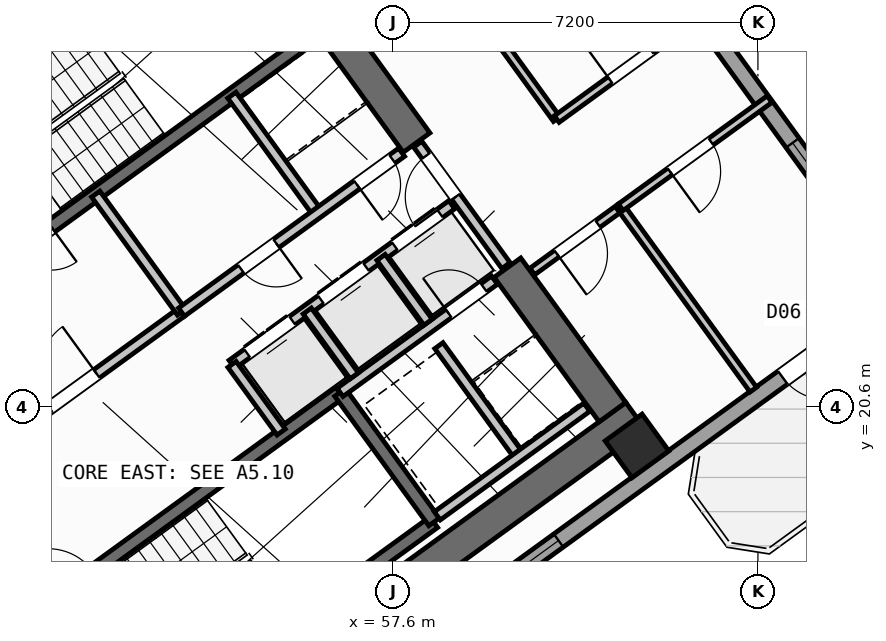
"""IFC4 building model, lengths in metres.
Left out: names, types, materials, properties, quantities, classifications, styles, units other than length and angle.
Written with IfcOpenShell. Run it as: python <this file> out.ifc"""

import sys

from ifc_helpers import new_model, si_unit, direction, frame, frame_2d, origin, origin_2d, place, context, subcontext, project, spatial, rectangle, hollow_rectangle, extrude, source, transform, mapped, element, fill, save


model = new_model("IFC4")
c1 = context("Model", 3, precision=1e-05, world=origin(), true_north=direction((0.0, 1.0)))
c2 = subcontext(c1, "Body", "Model", "MODEL_VIEW")
j1 = project(units=[si_unit("LENGTHUNIT", "METRE"), si_unit("PLANEANGLEUNIT", "RADIAN")], contexts=[c1])
p1 = place(None, origin())
s1 = spatial("IfcSite", under=j1, at=p1, CompositionType="ELEMENT")
p2 = place(p1, origin())
s2 = spatial("IfcBuilding", under=s1, at=p2, CompositionType="ELEMENT")
p3 = place(p2, frame((0.0, 0.0, 90.0)))
s3 = spatial("IfcBuildingStorey", under=s2, at=p3, CompositionType="ELEMENT", Elevation=90.0)
p4 = place(p3, frame((52.318, 13.11, 0.0), z_axis=(0.0, 0.0, 1.0), x_axis=(0.809019445368, 0.587781878776, 0.0)))
e1 = element("IfcWall", 1, at=p4, inside=s3, PredefinedType="SHEAR", context=c2, shape_type="SweptSolid", body=[
    extrude(rectangle(XDim=12.44, YDim=0.65, at=frame_2d((6.22, 0.0))), origin(), (0.0, 0.0, 1.0), 3.35),
])
p5 = place(p3, frame((44.325, 24.113, 0.0), z_axis=(0.0, 0.0, 1.0), x_axis=(0.809012664862, 0.58779121131, 0.0)))
e2 = element("IfcWall", 2, at=p5, inside=s3, PredefinedType="SHEAR", context=c2, shape_type="SweptSolid", body=[
    extrude(rectangle(XDim=12.44, YDim=0.65, at=frame_2d((6.22, 0.0))), origin(), (0.0, 0.0, 1.0), 3.35),
])
p6 = place(p3, frame((61.929, 20.494, 0.0), z_axis=(0.0, 0.0, 1.0), x_axis=(-0.58782982593, 0.808984607855, 0.0)))
e3 = element("IfcWall", 3, at=p6, inside=s3, PredefinedType="SHEAR", context=c2, shape_type="SweptSolid", body=[
    extrude(rectangle(XDim=3.525, YDim=0.65, at=frame_2d((1.762, 0.0))), origin(), (0.0, 0.0, 1.0), 3.35),
])
p7 = place(p3, frame((58.064, 25.813, 0.0), z_axis=(0.0, 0.0, 1.0), x_axis=(-0.58777996584, 0.809020835181, 0.0)))
e4 = element("IfcWall", 4, at=p7, inside=s3, PredefinedType="SHEAR", context=c2, shape_type="SweptSolid", body=[
    extrude(rectangle(XDim=6.375, YDim=0.65, at=frame_2d((3.188, 0.0))), origin(), (0.0, 0.0, 1.0), 3.35),
])
m1 = source(origin(), c2, "Body", "SweptSolid", [
    extrude(hollow_rectangle(XDim=0.9, YDim=0.9, WallThickness=0.036, at=origin_2d()), origin(), (0.0, 0.0, 1.0), 3.6),
])
p8 = place(p3, frame((62.414, 19.827, 0.0), z_axis=(0.0, 0.0, 1.0), x_axis=(0.809016994375, 0.587785252292, 0.0)))
e5 = element("IfcColumn", 5, at=p8, inside=s3, PredefinedType="COLUMN", context=c2, shape_type="MappedRepresentation", body=[
    mapped(m1, transform((0.0, 0.0, 0.0), scale=1.0)),
])
p9 = place(p3, frame((54.81, 40.5, 0.0), z_axis=(0.0, 0.0, 1.0), x_axis=(0.587783625747, -0.809018176127, 0.0)))
e6 = element("IfcWall", 6, at=p9, inside=s3, PredefinedType="STANDARD", context=c2, shape_type="SweptSolid", body=[
    extrude(rectangle(XDim=21.587, YDim=0.32, at=frame_2d((10.794, 0.0))), origin(), (0.0, 0.0, 1.0), 2.775),
])
p10 = place(p9, frame((9.194, 0.0, 0.8)))
e7 = element("IfcOpeningElement", 7, at=p10, cuts=e6, PredefinedType="OPENING", context=c2, shape_type="SweptSolid", body=[
    extrude(rectangle(XDim=2.1, YDim=1.55, at=frame_2d((1.05, 0.775))), frame((0.0, 0.17, 0.0), z_axis=(0.0, -1.0, 0.0), x_axis=(1.0, 0.0, 0.0)), (0.0, 0.0, 1.0), 0.34),
])
p11 = place(p9, frame((18.159, 0.0, 0.85)))
e8 = element("IfcOpeningElement", 8, at=p11, cuts=e6, PredefinedType="OPENING", context=c2, shape_type="SweptSolid", body=[
    extrude(rectangle(XDim=1.8, YDim=1.5, at=frame_2d((0.9, 0.75))), frame((0.0, 0.17, 0.0), z_axis=(0.0, -1.0, 0.0), x_axis=(1.0, 0.0, 0.0)), (0.0, 0.0, 1.0), 0.34),
])
p12 = place(p3, frame((67.454, 22.747, 0.0), z_axis=(0.0, 0.0, 1.0), x_axis=(-0.809021120468, -0.587779573171, 0.0)))
e9 = element("IfcWall", 9, at=p12, inside=s3, PredefinedType="STANDARD", context=c2, shape_type="SweptSolid", body=[
    extrude(rectangle(XDim=17.588, YDim=0.32, at=frame_2d((8.794, 0.0))), origin(), (0.0, 0.0, 1.0), 3.35),
])
p13 = place(p12, frame((1.624, 0.0, 0.0)))
e10 = element("IfcOpeningElement", 10, at=p13, cuts=e9, PredefinedType="OPENING", context=c2, shape_type="SweptSolid", body=[
    extrude(rectangle(XDim=1.05, YDim=2.15, at=frame_2d((0.525, 1.075))), frame((0.0, 0.17, 0.0), z_axis=(0.0, -1.0, 0.0), x_axis=(1.0, 0.0, 0.0)), (0.0, 0.0, 1.0), 0.34),
])
p14 = place(p12, frame((8.144, 0.0, 0.8)))
e11 = element("IfcOpeningElement", 11, at=p14, cuts=e9, PredefinedType="OPENING", context=c2, shape_type="SweptSolid", body=[
    extrude(rectangle(XDim=2.1, YDim=1.55, at=frame_2d((1.05, 0.775))), frame((0.0, 0.17, 0.0), z_axis=(0.0, -1.0, 0.0), x_axis=(1.0, 0.0, 0.0)), (0.0, 0.0, 1.0), 0.34),
])
p15 = place(p12, frame((13.344, 0.0, 0.8)))
e12 = element("IfcOpeningElement", 12, at=p15, cuts=e9, PredefinedType="OPENING", context=c2, shape_type="SweptSolid", body=[
    extrude(rectangle(XDim=2.1, YDim=1.55, at=frame_2d((1.05, 0.775))), frame((0.0, 0.17, 0.0), z_axis=(0.0, -1.0, 0.0), x_axis=(1.0, 0.0, 0.0)), (0.0, 0.0, 1.0), 0.34),
])
p16 = place(p3, frame((48.006, 25.996, 0.0), z_axis=(0.0, 0.0, 1.0), x_axis=(0.80901903764, 0.587782439969, 0.0)))
e13 = element("IfcWall", 13, at=p16, inside=s3, PredefinedType="SHEAR", context=c2, shape_type="SweptSolid", body=[
    extrude(rectangle(XDim=7.46, YDim=0.26, at=frame_2d((3.73, 0.0))), origin(), (0.0, 0.0, 1.0), 3.35),
])
p17 = place(p3, frame((49.863, 23.44, 0.0), z_axis=(0.0, 0.0, 1.0), x_axis=(0.809003474932, 0.587803859759, 0.0)))
e14 = element("IfcWall", 14, at=p17, inside=s3, PredefinedType="SHEAR", context=c2, shape_type="SweptSolid", body=[
    extrude(rectangle(XDim=7.46, YDim=0.26, at=frame_2d((3.73, 0.0))), origin(), (0.0, 0.0, 1.0), 3.35),
])
p18 = place(p17, frame((0.36, 0.0, 0.0)))
e15 = element("IfcOpeningElement", 15, at=p18, cuts=e14, PredefinedType="OPENING", context=c2, shape_type="SweptSolid", body=[
    extrude(rectangle(XDim=0.86, YDim=2.05, at=frame_2d((0.43, 1.025))), frame((0.0, 0.14, 0.0), z_axis=(0.0, -1.0, 0.0), x_axis=(1.0, 0.0, 0.0)), (0.0, 0.0, 1.0), 0.28),
])
p19 = place(p3, frame((52.472, 14.013, 0.0), z_axis=(0.0, 0.0, 1.0), x_axis=(0.809028366311, 0.587769599847, 0.0)))
e16 = element("IfcWall", 16, at=p19, inside=s3, PredefinedType="SHEAR", context=c2, shape_type="SweptSolid", body=[
    extrude(rectangle(XDim=7.33, YDim=0.26, at=frame_2d((3.665, 0.0))), origin(), (0.0, 0.0, 1.0), 3.35),
])
p20 = place(p3, frame((50.615, 16.57, 0.0), z_axis=(0.0, 0.0, 1.0), x_axis=(0.809028366311, 0.587769599847, 0.0)))
e17 = element("IfcWall", 17, at=p20, inside=s3, PredefinedType="SHEAR", context=c2, shape_type="SweptSolid", body=[
    extrude(rectangle(XDim=7.33, YDim=0.26, at=frame_2d((3.665, 0.0))), origin(), (0.0, 0.0, 1.0), 3.35),
])
p21 = place(p20, frame((0.22, 0.0, 0.0)))
e18 = element("IfcOpeningElement", 18, at=p21, cuts=e17, PredefinedType="OPENING", context=c2, shape_type="SweptSolid", body=[
    extrude(rectangle(XDim=1.1, YDim=2.1, at=frame_2d((0.55, 1.05))), frame((0.0, 0.14, 0.0), z_axis=(0.0, -1.0, 0.0), x_axis=(1.0, 0.0, 0.0)), (0.0, 0.0, 1.0), 0.28),
])
p22 = place(p3, frame((58.41, 18.327, 0.0), z_axis=(0.0, 0.0, 1.0), x_axis=(-0.58776738483, 0.809029975545, 0.0)))
e19 = element("IfcWall", 19, at=p22, inside=s3, PredefinedType="SHEAR", context=c2, shape_type="SweptSolid", body=[
    extrude(rectangle(XDim=3.16, YDim=0.26, at=frame_2d((1.58, 0.0))), origin(), (0.0, 0.0, 1.0), 3.35),
])
p23 = place(p3, frame((48.799, 19.107, 0.0), z_axis=(0.0, 0.0, 1.0), x_axis=(0.809012959416, 0.587790805897, 0.0)))
e20 = element("IfcWall", 20, at=p23, inside=s3, PredefinedType="STANDARD", context=c2, shape_type="SweptSolid", body=[
    extrude(rectangle(XDim=5.718, YDim=0.2, at=frame_2d((2.859, 0.0))), origin(), (0.0, 0.0, 1.0), 3.34),
])
p24 = place(p23, frame((2.498, 0.0, 0.0)))
e21 = element("IfcOpeningElement", 21, at=p24, cuts=e20, PredefinedType="OPENING", context=c2, shape_type="SweptSolid", body=[
    extrude(rectangle(XDim=1.15, YDim=2.1, at=frame_2d((0.575, 1.05))), frame((0.0, 0.11, 0.0), z_axis=(0.0, -1.0, 0.0), x_axis=(1.0, 0.0, 0.0)), (0.0, 0.0, 1.0), 0.22),
])
p25 = place(p3, frame((56.553, 20.884, 0.0), z_axis=(0.0, 0.0, 1.0), x_axis=(0.809035789462, 0.587759382205, 0.0)))
e22 = element("IfcWall", 22, at=p25, inside=s3, PredefinedType="STANDARD", context=c2, shape_type="SweptSolid", body=[
    extrude(rectangle(XDim=3.768, YDim=0.2, at=frame_2d((1.884, 0.0))), origin(), (0.0, 0.0, 1.0), 3.34),
])
p26 = place(p25, frame((2.65, 0.0, 0.0)))
e23 = element("IfcOpeningElement", 23, at=p26, cuts=e22, PredefinedType="OPENING", context=c2, shape_type="SweptSolid", body=[
    extrude(rectangle(XDim=0.86, YDim=2.05, at=frame_2d((0.43, 1.025))), frame((0.0, 0.11, 0.0), z_axis=(0.0, -1.0, 0.0), x_axis=(1.0, 0.0, 0.0)), (0.0, 0.0, 1.0), 0.22),
])
p27 = place(p3, frame((54.421, 21.436, 0.0), z_axis=(0.0, 0.0, 1.0), x_axis=(0.809013710463, 0.587789772183, 0.0)))
e24 = element("IfcWall", 24, at=p27, inside=s3, PredefinedType="STANDARD", context=c2, shape_type="SweptSolid", body=[
    extrude(rectangle(XDim=5.36, YDim=0.2, at=frame_2d((2.68, 0.0))), origin(), (0.0, 0.0, 1.0), 3.34),
])
p28 = place(p27, frame((0.37, 0.0, 0.0)))
e25 = element("IfcOpeningElement", 25, at=p28, cuts=e24, PredefinedType="OPENING", context=c2, shape_type="SweptSolid", body=[
    extrude(rectangle(XDim=1.1, YDim=2.15, at=frame_2d((0.55, 1.075))), frame((0.0, 0.11, 0.0), z_axis=(0.0, -1.0, 0.0), x_axis=(1.0, 0.0, 0.0)), (0.0, 0.0, 1.0), 0.22),
])
p29 = place(p27, frame((2.17, 0.0, 0.0)))
e26 = element("IfcOpeningElement", 26, at=p29, cuts=e24, PredefinedType="OPENING", context=c2, shape_type="SweptSolid", body=[
    extrude(rectangle(XDim=1.1, YDim=2.15, at=frame_2d((0.55, 1.075))), frame((0.0, 0.11, 0.0), z_axis=(0.0, -1.0, 0.0), x_axis=(1.0, 0.0, 0.0)), (0.0, 0.0, 1.0), 0.22),
])
p30 = place(p27, frame((3.97, 0.0, 0.0)))
e27 = element("IfcOpeningElement", 27, at=p30, cuts=e24, PredefinedType="OPENING", context=c2, shape_type="SweptSolid", body=[
    extrude(rectangle(XDim=1.1, YDim=2.15, at=frame_2d((0.55, 1.075))), frame((0.0, 0.11, 0.0), z_axis=(0.0, -1.0, 0.0), x_axis=(1.0, 0.0, 0.0)), (0.0, 0.0, 1.0), 0.22),
])
p31 = place(p3, frame((55.391, 20.102, 0.0), z_axis=(0.0, 0.0, 1.0), x_axis=(-0.58778447739, 0.809017557374, 0.0)))
e28 = element("IfcWall", 28, at=p31, inside=s3, PredefinedType="STANDARD", context=c2, shape_type="SweptSolid", body=[
    extrude(rectangle(XDim=1.65, YDim=0.2, at=frame_2d((0.825, 0.0))), origin(), (0.0, 0.0, 1.0), 3.34),
])
p32 = place(p3, frame((56.834, 21.212, 0.0), z_axis=(0.0, 0.0, 1.0), x_axis=(-0.58776738483, 0.809029975545, 0.0)))
e29 = element("IfcWall", 29, at=p32, inside=s3, PredefinedType="STANDARD", context=c2, shape_type="SweptSolid", body=[
    extrude(rectangle(XDim=1.58, YDim=0.2, at=frame_2d((0.79, 0.0))), origin(), (0.0, 0.0, 1.0), 3.34),
])
p33 = place(p3, frame((58.29, 22.27, 0.0), z_axis=(0.0, 0.0, 1.0), x_axis=(-0.587840865826, 0.808976585857, 0.0)))
e30 = element("IfcWall", 30, at=p33, inside=s3, PredefinedType="STANDARD", context=c2, shape_type="SweptSolid", body=[
    extrude(rectangle(XDim=1.58, YDim=0.2, at=frame_2d((0.79, 0.0))), origin(), (0.0, 0.0, 1.0), 3.34),
])
p34 = place(p3, frame((60.067, 19.655, 0.0), z_axis=(0.0, 0.0, 1.0), x_axis=(-0.587800520745, 0.809005900975, 0.0)))
e31 = element("IfcWall", 31, at=p34, inside=s3, PredefinedType="STANDARD", context=c2, shape_type="SweptSolid", body=[
    extrude(rectangle(XDim=2.66, YDim=0.2, at=frame_2d((1.33, 0.0))), origin(), (0.0, 0.0, 1.0), 3.34),
])
p35 = place(p3, frame((58.472, 18.447, 0.0), z_axis=(0.0, 0.0, 1.0), x_axis=(0.809022487728, 0.587777691266, 0.0)))
e32 = element("IfcWall", 32, at=p35, inside=s3, PredefinedType="STANDARD", context=c2, shape_type="SweptSolid", body=[
    extrude(rectangle(XDim=3.648, YDim=0.2, at=frame_2d((1.824, 0.0))), origin(), (0.0, 0.0, 1.0), 3.34),
])
p36 = place(p3, frame((53.425, 22.468, 0.0), z_axis=(0.0, 0.0, 1.0), x_axis=(-0.5877230039, 0.809062216821, 0.0)))
e33 = element("IfcWall", 33, at=p36, inside=s3, PredefinedType="STANDARD", context=c2, shape_type="SweptSolid", body=[
    extrude(rectangle(XDim=2.88, YDim=0.2, at=frame_2d((1.44, 0.0))), origin(), (0.0, 0.0, 1.0), 3.34),
])
p37 = place(p3, frame((56.111, 24.419, 0.0), z_axis=(0.0, 0.0, 1.0), x_axis=(-0.58777848983, 0.809021907548, 0.0)))
e34 = element("IfcWall", 34, at=p37, inside=s3, PredefinedType="STANDARD", context=c2, shape_type="SweptSolid", body=[
    extrude(rectangle(XDim=2.88, YDim=0.2, at=frame_2d((1.44, 0.0))), origin(), (0.0, 0.0, 1.0), 3.34),
])
p38 = place(p3, frame((53.425, 22.468, 0.0), z_axis=(0.0, 0.0, 1.0), x_axis=(0.80902705128, 0.587771409902, 0.0)))
e35 = element("IfcWall", 35, at=p38, inside=s3, PredefinedType="STANDARD", context=c2, shape_type="SweptSolid", body=[
    extrude(rectangle(XDim=5.368, YDim=0.2, at=frame_2d((2.684, 0.0))), origin(), (0.0, 0.0, 1.0), 3.34),
])
p39 = place(p38, frame((4.28, 0.0, 0.0)))
e36 = element("IfcOpeningElement", 36, at=p39, cuts=e35, PredefinedType="OPENING", context=c2, shape_type="SweptSolid", body=[
    extrude(rectangle(XDim=0.86, YDim=2.05, at=frame_2d((0.43, 1.025))), frame((0.0, 0.11, 0.0), z_axis=(0.0, -1.0, 0.0), x_axis=(1.0, 0.0, 0.0)), (0.0, 0.0, 1.0), 0.22),
])
p40 = place(p38, frame((1.45, 0.0, 0.0)))
e37 = element("IfcOpeningElement", 37, at=p40, cuts=e35, PredefinedType="OPENING", context=c2, shape_type="SweptSolid", body=[
    extrude(rectangle(XDim=0.86, YDim=2.05, at=frame_2d((0.43, 1.025))), frame((0.0, 0.11, 0.0), z_axis=(0.0, -1.0, 0.0), x_axis=(1.0, 0.0, 0.0)), (0.0, 0.0, 1.0), 0.22),
])
p41 = place(p3, frame((59.827, 23.386, 0.0), z_axis=(0.0, 0.0, 1.0), x_axis=(-0.587803840107, 0.809003489211, 0.0)))
e38 = element("IfcWall", 38, at=p41, inside=s3, PredefinedType="STANDARD", context=c2, shape_type="SweptSolid", body=[
    extrude(rectangle(XDim=2.96, YDim=0.2, at=frame_2d((1.48, 0.0))), origin(), (0.0, 0.0, 1.0), 3.34),
])
p42 = place(p41, frame((1.68, 0.0, 0.0)))
e39 = element("IfcOpeningElement", 39, at=p42, cuts=e38, PredefinedType="OPENING", context=c2, shape_type="SweptSolid", body=[
    extrude(rectangle(XDim=1.0, YDim=2.1, at=frame_2d((0.5, 1.05))), frame((0.0, 0.11, 0.0), z_axis=(0.0, -1.0, 0.0), x_axis=(1.0, 0.0, 0.0)), (0.0, 0.0, 1.0), 0.22),
])
p43 = place(p3, frame((60.347, 23.27, 0.0), z_axis=(0.0, 0.0, 1.0), x_axis=(0.80899039758, 0.587821857898, 0.0)))
e40 = element("IfcWall", 40, at=p43, inside=s3, PredefinedType="PARTITIONING", context=c2, shape_type="SweptSolid", body=[
    extrude(rectangle(XDim=2.158, YDim=0.16, at=frame_2d((1.079, 0.0))), origin(), (0.0, 0.0, 1.0), 3.34),
])
p44 = place(p43, frame((0.598, 0.0, 0.0)))
e41 = element("IfcOpeningElement", 41, at=p44, cuts=e40, PredefinedType="OPENING", context=c2, shape_type="SweptSolid", body=[
    extrude(rectangle(XDim=1.0, YDim=2.1, at=frame_2d((0.5, 1.05))), frame((0.0, 0.09, 0.0), z_axis=(0.0, -1.0, 0.0), x_axis=(1.0, 0.0, 0.0)), (0.0, 0.0, 1.0), 0.18),
])
p45 = place(p3, frame((64.709, 20.938, 0.0), z_axis=(0.0, 0.0, 1.0), x_axis=(-0.587773666605, 0.809025411743, 0.0)))
e42 = element("IfcWall", 42, at=p45, inside=s3, PredefinedType="PARTITIONING", context=c2, shape_type="SweptSolid", body=[
    extrude(rectangle(XDim=4.45, YDim=0.16, at=frame_2d((2.225, 0.0))), origin(), (0.0, 0.0, 1.0), 3.34),
])
p46 = place(p3, frame((60.829, 26.278, 0.0), z_axis=(0.0, 0.0, 1.0), x_axis=(-0.587777474174, 0.809022645451, 0.0)))
e43 = element("IfcWall", 43, at=p46, inside=s3, PredefinedType="PARTITIONING", context=c2, shape_type="SweptSolid", body=[
    extrude(rectangle(XDim=15.1, YDim=0.16, at=frame_2d((7.55, 0.0))), origin(), (0.0, 0.0, 1.0), 3.34),
])
p47 = place(p3, frame((62.093, 24.538, 0.0), z_axis=(0.0, 0.0, 1.0), x_axis=(0.809035546126, 0.58775971715, 0.0)))
e44 = element("IfcWall", 44, at=p47, inside=s3, PredefinedType="PARTITIONING", context=c2, shape_type="SweptSolid", body=[
    extrude(rectangle(XDim=3.63, YDim=0.16, at=frame_2d((1.815, 0.0))), origin(), (0.0, 0.0, 1.0), 3.34),
])
p48 = place(p47, frame((1.2, 0.0, 0.0)))
e45 = element("IfcOpeningElement", 45, at=p48, cuts=e44, PredefinedType="OPENING", context=c2, shape_type="SweptSolid", body=[
    extrude(rectangle(XDim=1.0, YDim=2.1, at=frame_2d((0.5, 1.05))), frame((0.0, 0.09, 0.0), z_axis=(0.0, -1.0, 0.0), x_axis=(1.0, 0.0, 0.0)), (0.0, 0.0, 1.0), 0.18),
])
p49 = place(p3, frame((60.829, 26.278, 0.0), z_axis=(0.0, 0.0, 1.0), x_axis=(0.809003564202, 0.587803736896, 0.0)))
e46 = element("IfcWall", 46, at=p49, inside=s3, PredefinedType="PARTITIONING", context=c2, shape_type="SweptSolid", body=[
    extrude(rectangle(XDim=3.63, YDim=0.16, at=frame_2d((1.815, 0.0))), origin(), (0.0, 0.0, 1.0), 3.34),
])
p50 = place(p49, frame((1.305, 0.0, 0.0)))
e47 = element("IfcOpeningElement", 47, at=p50, cuts=e46, PredefinedType="OPENING", context=c2, shape_type="SweptSolid", body=[
    extrude(rectangle(XDim=1.0, YDim=2.1, at=frame_2d((0.5, 1.05))), frame((0.0, 0.09, 0.0), z_axis=(0.0, -1.0, 0.0), x_axis=(1.0, 0.0, 0.0)), (0.0, 0.0, 1.0), 0.18),
])
p51 = place(p3, frame((42.866, 26.044, 0.0), z_axis=(0.0, 0.0, 1.0), x_axis=(0.809020254154, 0.587780765566, 0.0)))
e48 = element("IfcWall", 48, at=p51, inside=s3, PredefinedType="PARTITIONING", context=c2, shape_type="SweptSolid", body=[
    extrude(rectangle(XDim=14.67, YDim=0.16, at=frame_2d((7.335, 0.0))), origin(), (0.0, 0.0, 1.0), 3.34),
])
p52 = place(p51, frame((10.2, 0.0, 0.0)))
e49 = element("IfcOpeningElement", 49, at=p52, cuts=e48, PredefinedType="OPENING", context=c2, shape_type="SweptSolid", body=[
    extrude(rectangle(XDim=1.0, YDim=2.1, at=frame_2d((0.5, 1.05))), frame((0.0, 0.09, 0.0), z_axis=(0.0, -1.0, 0.0), x_axis=(1.0, 0.0, 0.0)), (0.0, 0.0, 1.0), 0.18),
])
m2 = source(origin(), c2, "Body", "SweptSolid", [
    extrude(rectangle(XDim=1.05, YDim=2.15, at=frame_2d((0.525, 1.075))), frame((0.0, 0.025, 0.0), z_axis=(0.0, -1.0, 0.0), x_axis=(1.0, 0.0, 0.0)), (0.0, 0.0, 1.0), 0.05),
])
p53 = place(p13, origin())
e50 = element("IfcDoor", 50, at=p53, inside=s3, OperationType="SINGLE_SWING_LEFT", PredefinedType="DOOR", context=c2, shape_type="MappedRepresentation", body=[
    mapped(m2, transform((0.0, 0.0, 0.0), scale=1.0)),
])
fill(e10, e50)
m3 = source(origin(), c2, "Body", "SweptSolid", [
    extrude(rectangle(XDim=1.8, YDim=1.5, at=frame_2d((0.9, 0.75))), frame((0.0, 0.03, 0.0), z_axis=(0.0, -1.0, 0.0), x_axis=(1.0, 0.0, 0.0)), (0.0, 0.0, 1.0), 0.06),
])
p54 = place(p11, origin())
e51 = element("IfcWindow", 51, at=p54, inside=s3, PartitioningType="SINGLE_PANEL", PredefinedType="WINDOW", context=c2, shape_type="MappedRepresentation", body=[
    mapped(m3, transform((0.0, 0.0, 0.0), scale=1.0)),
])
fill(e8, e51)
m4 = source(origin(), c2, "Body", "SweptSolid", [
    extrude(rectangle(XDim=2.1, YDim=1.55, at=frame_2d((1.05, 0.775))), frame((0.0, 0.03, 0.0), z_axis=(0.0, -1.0, 0.0), x_axis=(1.0, 0.0, 0.0)), (0.0, 0.0, 1.0), 0.06),
])
p55 = place(p14, origin())
e52 = element("IfcWindow", 52, at=p55, inside=s3, PartitioningType="SINGLE_PANEL", PredefinedType="WINDOW", context=c2, shape_type="MappedRepresentation", body=[
    mapped(m4, transform((0.0, 0.0, 0.0), scale=1.0)),
])
fill(e11, e52)
m5 = source(origin(), c2, "Body", "SweptSolid", [
    extrude(rectangle(XDim=1.15, YDim=2.1, at=frame_2d((0.575, 1.05))), frame((0.0, 0.025, 0.0), z_axis=(0.0, -1.0, 0.0), x_axis=(1.0, 0.0, 0.0)), (0.0, 0.0, 1.0), 0.05),
])
p56 = place(p24, origin())
e53 = element("IfcDoor", 53, at=p56, inside=s3, OperationType="SINGLE_SWING_RIGHT", PredefinedType="DOOR", context=c2, shape_type="MappedRepresentation", body=[
    mapped(m5, transform((0.0, 0.0, 0.0), scale=1.0)),
])
fill(e21, e53)
m6 = source(origin(), c2, "Body", "SweptSolid", [
    extrude(rectangle(XDim=1.1, YDim=2.15, at=frame_2d((0.55, 1.075))), frame((0.0, 0.025, 0.0), z_axis=(0.0, -1.0, 0.0), x_axis=(1.0, 0.0, 0.0)), (0.0, 0.0, 1.0), 0.05),
])
p57 = place(p28, origin())
e54 = element("IfcDoor", 54, at=p57, inside=s3, OperationType="DOUBLE_DOOR_SLIDING", PredefinedType="DOOR", context=c2, shape_type="MappedRepresentation", body=[
    mapped(m6, transform((0.0, 0.0, 0.0), scale=1.0)),
])
fill(e25, e54)
p58 = place(p29, origin())
e55 = element("IfcDoor", 55, at=p58, inside=s3, OperationType="DOUBLE_DOOR_SLIDING", PredefinedType="DOOR", context=c2, shape_type="MappedRepresentation", body=[
    mapped(m6, transform((0.0, 0.0, 0.0), scale=1.0)),
])
fill(e26, e55)
p59 = place(p30, origin())
e56 = element("IfcDoor", 56, at=p59, inside=s3, OperationType="DOUBLE_DOOR_SLIDING", PredefinedType="DOOR", context=c2, shape_type="MappedRepresentation", body=[
    mapped(m6, transform((0.0, 0.0, 0.0), scale=1.0)),
])
fill(e27, e56)
m7 = source(origin(), c2, "Body", "SweptSolid", [
    extrude(rectangle(XDim=0.86, YDim=2.05, at=frame_2d((0.43, 1.025))), frame((0.0, 0.025, 0.0), z_axis=(0.0, -1.0, 0.0), x_axis=(1.0, 0.0, 0.0)), (0.0, 0.0, 1.0), 0.05),
])
p60 = place(p26, origin())
e57 = element("IfcDoor", 57, at=p60, inside=s3, OperationType="SINGLE_SWING_LEFT", PredefinedType="DOOR", context=c2, shape_type="MappedRepresentation", body=[
    mapped(m7, transform((0.0, 0.0, 0.0), scale=1.0)),
])
fill(e23, e57)
p61 = place(p39, frame((0.86, 0.0, 0.0), z_axis=(0.0, 0.0, 1.0), x_axis=(-1.0, 0.0, 0.0)))
e58 = element("IfcDoor", 58, at=p61, inside=s3, OperationType="SINGLE_SWING_RIGHT", PredefinedType="DOOR", context=c2, shape_type="MappedRepresentation", body=[
    mapped(m7, transform((0.0, 0.0, 0.0), scale=1.0)),
])
fill(e36, e58)
p62 = place(p40, frame((0.86, 0.0, 0.0), z_axis=(0.0, 0.0, 1.0), x_axis=(-1.0, 0.0, 0.0)))
e59 = element("IfcDoor", 59, at=p62, inside=s3, OperationType="SINGLE_SWING_LEFT", PredefinedType="DOOR", context=c2, shape_type="MappedRepresentation", body=[
    mapped(m7, transform((0.0, 0.0, 0.0), scale=1.0)),
])
fill(e37, e59)
m8 = source(origin(), c2, "Body", "SweptSolid", [
    extrude(rectangle(XDim=1.0, YDim=2.1, at=frame_2d((0.5, 1.05))), frame((0.0, 0.025, 0.0), z_axis=(0.0, -1.0, 0.0), x_axis=(1.0, 0.0, 0.0)), (0.0, 0.0, 1.0), 0.05),
])
p63 = place(p44, frame((1.0, 0.0, 0.0), z_axis=(0.0, 0.0, 1.0), x_axis=(-1.0, 0.0, 0.0)))
e60 = element("IfcDoor", 60, at=p63, inside=s3, OperationType="SINGLE_SWING_RIGHT", PredefinedType="DOOR", context=c2, shape_type="MappedRepresentation", body=[
    mapped(m8, transform((0.0, 0.0, 0.0), scale=1.0)),
])
fill(e41, e60)
p64 = place(p42, origin())
e61 = element("IfcDoor", 61, at=p64, inside=s3, OperationType="SINGLE_SWING_LEFT", PredefinedType="DOOR", context=c2, shape_type="MappedRepresentation", body=[
    mapped(m8, transform((0.0, 0.0, 0.0), scale=1.0)),
])
fill(e39, e61)
p65 = place(p50, origin())
e62 = element("IfcDoor", 62, at=p65, inside=s3, OperationType="SINGLE_SWING_LEFT", PredefinedType="DOOR", context=c2, shape_type="MappedRepresentation", body=[
    mapped(m8, transform((0.0, 0.0, 0.0), scale=1.0)),
])
fill(e47, e62)
p66 = place(p48, frame((1.0, 0.0, 0.0), z_axis=(0.0, 0.0, 1.0), x_axis=(-1.0, 0.0, 0.0)))
e63 = element("IfcDoor", 63, at=p66, inside=s3, OperationType="SINGLE_SWING_RIGHT", PredefinedType="DOOR", context=c2, shape_type="MappedRepresentation", body=[
    mapped(m8, transform((0.0, 0.0, 0.0), scale=1.0)),
])
fill(e45, e63)
save(model, sys.argv[1])
